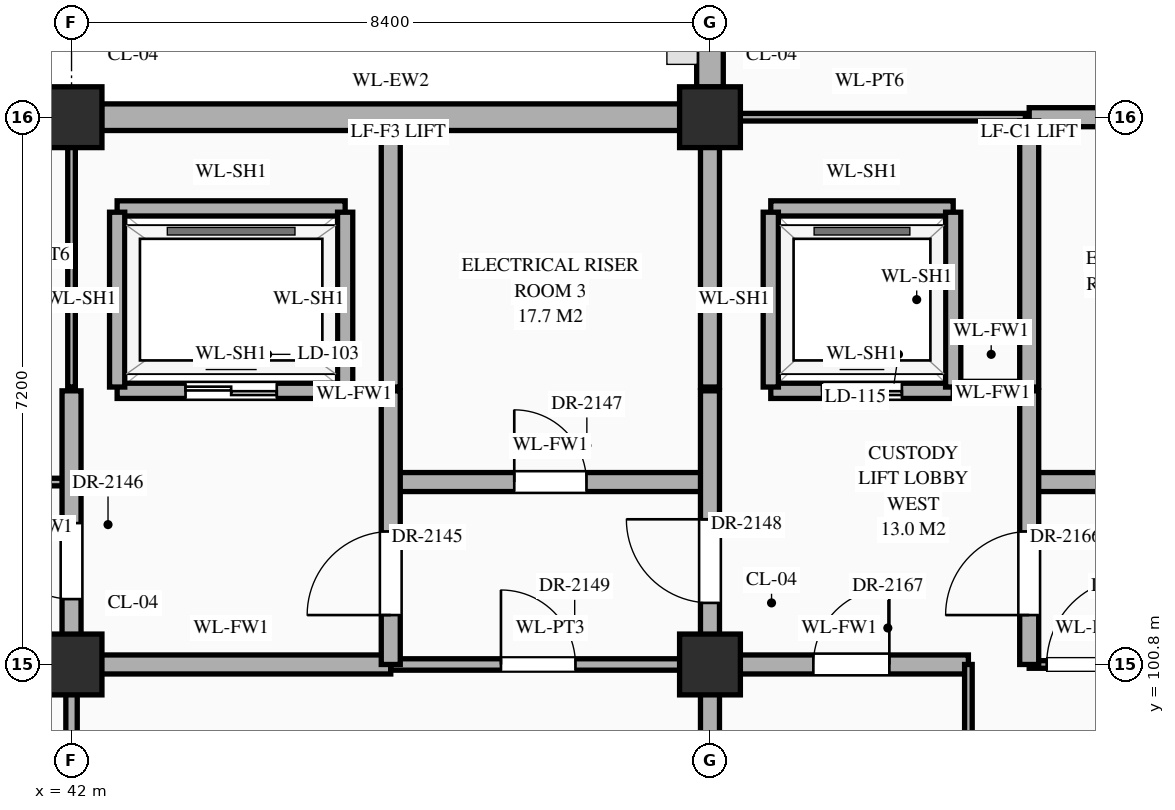
"""IFC4 building model, lengths in metres.
Left out: names, types, materials, properties, quantities, classifications, styles, units other than length and angle.
Written with IfcOpenShell. Run it as: python <this file> out.ifc"""

import sys

from ifc_helpers import new_model, si_unit, direction, frame, frame_2d, origin, origin_2d, place, context, subcontext, project, spatial, rectangle, extrude, element, fill, save


model = new_model("IFC4")
c1 = context("Model", 3, precision=1e-05, world=origin(), true_north=direction((0.0, 1.0)))
c2 = subcontext(c1, "Body", "Model", "MODEL_VIEW")
j1 = project(units=[si_unit("LENGTHUNIT", "METRE"), si_unit("PLANEANGLEUNIT", "RADIAN")], contexts=[c1])
p1 = place(None, origin())
s1 = spatial("IfcSite", under=j1, at=p1, CompositionType="ELEMENT")
p2 = place(p1, origin())
s2 = spatial("IfcBuilding", under=s1, at=p2, CompositionType="ELEMENT")
p3 = place(p2, frame((0.0, 0.0, 26.1)))
s3 = spatial("IfcBuildingStorey", under=s2, at=p3, CompositionType="ELEMENT", Elevation=26.1)
for number, where, z_axis, x_axis in (
    (1, (42.0, 100.8, 0.0), (0.0, 0.0, 1.0), (1.0, 0.0, 0.0)),
    (2, (42.0, 108.0, 0.0), (0.0, 0.0, 1.0), (1.0, 0.0, 0.0)),
    (3, (50.4, 100.8, 0.0), (0.0, 0.0, 1.0), (1.0, 0.0, 0.0)),
    (4, (50.4, 108.0, 0.0), (0.0, 0.0, 1.0), (1.0, 0.0, 0.0)),
):
    element("IfcColumn", number, at=place(p3, frame(where, z_axis=z_axis, x_axis=x_axis)), inside=s3, PredefinedType="COLUMN", context=c2, shape_type="SweptSolid", body=[
        extrude(rectangle(XDim=0.8, YDim=0.8, at=origin_2d()), origin(), (0.0, 0.0, 1.0), 4.5),
    ])
p4 = place(p3, frame((42.395, 108.0, 0.0), z_axis=(0.0, 0.0, 1.0), x_axis=(1.0, 0.0, 0.0)))
e5 = element("IfcWall", 5, at=p4, inside=s3, PredefinedType="STANDARD", context=c2, shape_type="SweptSolid", body=[
    extrude(rectangle(XDim=7.61, YDim=0.35, at=frame_2d((3.805, 0.0))), origin(), (0.0, 0.0, 1.0), 3.59),
])
p5 = place(p3, frame((50.4, 108.395, 0.0), z_axis=(0.0, 0.0, 1.0), x_axis=(0.0, 1.0, 0.0)))
e6 = element("IfcWall", 6, at=p5, inside=s3, PredefinedType="STANDARD", context=c2, shape_type="SweptSolid", body=[
    extrude(rectangle(XDim=6.41, YDim=0.35, at=frame_2d((3.205, 0.0))), origin(), (0.0, 0.0, 1.0), 3.59),
])
p6 = place(p5, frame((3.73, 0.0, 0.85)))
e7 = element("IfcOpeningElement", 7, at=p6, cuts=e6, PredefinedType="OPENING", context=c2, shape_type="SweptSolid", body=[
    extrude(rectangle(XDim=1.55, YDim=1.38, at=frame_2d((0.775, 0.69))), frame((0.0, 0.187, 0.0), z_axis=(0.0, -1.0, 0.0), x_axis=(1.0, 0.0, 0.0)), (0.0, 0.0, 1.0), 0.374),
])
p7 = place(p3, frame((31.0, 100.8, 0.0), z_axis=(0.0, 0.0, 1.0), x_axis=(1.0, 0.0, 0.0)))
e8 = element("IfcWall", 8, at=p7, inside=s3, PredefinedType="STANDARD", context=c2, shape_type="SweptSolid", body=[
    extrude(rectangle(XDim=11.0, YDim=0.15, at=frame_2d((5.5, 0.0))), origin(), (0.0, 0.0, 1.0), 3.39),
])
p8 = place(p7, frame((0.67, 0.0, 0.0)))
e9 = element("IfcOpeningElement", 9, at=p8, cuts=e8, PredefinedType="OPENING", context=c2, shape_type="SweptSolid", body=[
    extrude(rectangle(XDim=0.94, YDim=2.3, at=frame_2d((0.47, 1.15))), frame((0.0, 0.087, 0.0), z_axis=(0.0, -1.0, 0.0), x_axis=(1.0, 0.0, 0.0)), (0.0, 0.0, 1.0), 0.174),
])
p9 = place(p7, frame((6.31, 0.0, 0.0)))
e10 = element("IfcOpeningElement", 10, at=p9, cuts=e8, PredefinedType="OPENING", context=c2, shape_type="SweptSolid", body=[
    extrude(rectangle(XDim=0.98, YDim=2.35, at=frame_2d((0.49, 1.175))), frame((0.0, 0.087, 0.0), z_axis=(0.0, -1.0, 0.0), x_axis=(1.0, 0.0, 0.0)), (0.0, 0.0, 1.0), 0.174),
])
p10 = place(p3, frame((42.0, 100.8, 0.0), z_axis=(0.0, 0.0, 1.0), x_axis=(1.0, 0.0, 0.0)))
e11 = element("IfcWall", 11, at=p10, inside=s3, PredefinedType="STANDARD", context=c2, shape_type="SweptSolid", body=[
    extrude(rectangle(XDim=4.2, YDim=0.25, at=frame_2d((2.1, 0.0))), origin(), (0.0, 0.0, 1.0), 3.39),
])
p11 = place(p3, frame((46.2, 100.8, 0.0), z_axis=(0.0, 0.0, 1.0), x_axis=(1.0, 0.0, 0.0)))
e12 = element("IfcWall", 12, at=p11, inside=s3, PredefinedType="STANDARD", context=c2, shape_type="SweptSolid", body=[
    extrude(rectangle(XDim=4.2, YDim=0.15, at=frame_2d((2.1, 0.0))), origin(), (0.0, 0.0, 1.0), 3.39),
])
p12 = place(p11, frame((1.45, 0.0, 0.0)))
e13 = element("IfcOpeningElement", 13, at=p12, cuts=e12, PredefinedType="OPENING", context=c2, shape_type="SweptSolid", body=[
    extrude(rectangle(XDim=0.98, YDim=2.35, at=frame_2d((0.49, 1.175))), frame((0.0, 0.087, 0.0), z_axis=(0.0, -1.0, 0.0), x_axis=(1.0, 0.0, 0.0)), (0.0, 0.0, 1.0), 0.174),
])
p13 = place(p3, frame((50.4, 100.8, 0.0), z_axis=(0.0, 0.0, 1.0), x_axis=(1.0, 0.0, 0.0)))
e14 = element("IfcWall", 14, at=p13, inside=s3, PredefinedType="STANDARD", context=c2, shape_type="SweptSolid", body=[
    extrude(rectangle(XDim=3.4, YDim=0.25, at=frame_2d((1.7, 0.0))), origin(), (0.0, 0.0, 1.0), 3.39),
])
p14 = place(p13, frame((1.36, 0.0, 0.0)))
e15 = element("IfcOpeningElement", 15, at=p14, cuts=e14, PredefinedType="OPENING", context=c2, shape_type="SweptSolid", body=[
    extrude(rectangle(XDim=1.0, YDim=2.2, at=frame_2d((0.5, 1.1))), frame((0.0, 0.137, 0.0), z_axis=(0.0, -1.0, 0.0), x_axis=(1.0, 0.0, 0.0)), (0.0, 0.0, 1.0), 0.274),
])
p15 = place(p3, frame((54.6, 100.8, 0.0), z_axis=(0.0, 0.0, 1.0), x_axis=(1.0, 0.0, 0.0)))
e16 = element("IfcWall", 16, at=p15, inside=s3, PredefinedType="STANDARD", context=c2, shape_type="SweptSolid", body=[
    extrude(rectangle(XDim=1.6, YDim=0.1, at=frame_2d((0.8, 0.0))), origin(), (0.0, 0.0, 1.0), 3.39),
])
p16 = place(p15, frame((0.23, 0.0, 0.0)))
e17 = element("IfcOpeningElement", 17, at=p16, cuts=e16, PredefinedType="OPENING", context=c2, shape_type="SweptSolid", body=[
    extrude(rectangle(XDim=1.14, YDim=2.4, at=frame_2d((0.57, 1.2))), frame((0.0, 0.062, 0.0), z_axis=(0.0, -1.0, 0.0), x_axis=(1.0, 0.0, 0.0)), (0.0, 0.0, 1.0), 0.124),
])
p17 = place(p3, frame((25.24, 103.2, 0.0), z_axis=(0.0, 0.0, 1.0), x_axis=(1.0, 0.0, 0.0)))
e18 = element("IfcWall", 18, at=p17, inside=s3, PredefinedType="STANDARD", context=c2, shape_type="SweptSolid", body=[
    extrude(rectangle(XDim=16.76, YDim=0.1, at=frame_2d((8.38, 0.0))), origin(), (0.0, 0.0, 1.0), 4.24),
])
p18 = place(p17, frame((3.6, 0.0, 0.0)))
e19 = element("IfcOpeningElement", 19, at=p18, cuts=e18, PredefinedType="OPENING", context=c2, shape_type="SweptSolid", body=[
    extrude(rectangle(XDim=1.16, YDim=2.3, at=frame_2d((0.58, 1.15))), frame((0.0, 0.062, 0.0), z_axis=(0.0, -1.0, 0.0), x_axis=(1.0, 0.0, 0.0)), (0.0, 0.0, 1.0), 0.124),
])
p19 = place(p17, frame((11.96, 0.0, 0.0)))
e20 = element("IfcOpeningElement", 20, at=p19, cuts=e18, PredefinedType="OPENING", context=c2, shape_type="SweptSolid", body=[
    extrude(rectangle(XDim=1.2, YDim=2.35, at=frame_2d((0.6, 1.175))), frame((0.0, 0.062, 0.0), z_axis=(0.0, -1.0, 0.0), x_axis=(1.0, 0.0, 0.0)), (0.0, 0.0, 1.0), 0.124),
])
p20 = place(p3, frame((46.2, 103.2, 0.0), z_axis=(0.0, 0.0, 1.0), x_axis=(1.0, 0.0, 0.0)))
e21 = element("IfcWall", 21, at=p20, inside=s3, PredefinedType="STANDARD", context=c2, shape_type="SweptSolid", body=[
    extrude(rectangle(XDim=4.2, YDim=0.25, at=frame_2d((2.1, 0.0))), origin(), (0.0, 0.0, 1.0), 4.24),
])
p21 = place(p20, frame((1.625, 0.0, 0.0)))
e22 = element("IfcOpeningElement", 22, at=p21, cuts=e21, PredefinedType="OPENING", context=c2, shape_type="SweptSolid", body=[
    extrude(rectangle(XDim=0.95, YDim=2.15, at=frame_2d((0.475, 1.075))), frame((0.0, 0.137, 0.0), z_axis=(0.0, -1.0, 0.0), x_axis=(1.0, 0.0, 0.0)), (0.0, 0.0, 1.0), 0.274),
])
p22 = place(p3, frame((54.6, 103.2, 0.0), z_axis=(0.0, 0.0, 1.0), x_axis=(1.0, 0.0, 0.0)))
e23 = element("IfcWall", 23, at=p22, inside=s3, PredefinedType="STANDARD", context=c2, shape_type="SweptSolid", body=[
    extrude(rectangle(XDim=4.2, YDim=0.25, at=frame_2d((2.1, 0.0))), origin(), (0.0, 0.0, 1.0), 4.24),
])
p23 = place(p22, frame((1.625, 0.0, 0.0)))
e24 = element("IfcOpeningElement", 24, at=p23, cuts=e23, PredefinedType="OPENING", context=c2, shape_type="SweptSolid", body=[
    extrude(rectangle(XDim=0.95, YDim=2.15, at=frame_2d((0.475, 1.075))), frame((0.0, 0.137, 0.0), z_axis=(0.0, -1.0, 0.0), x_axis=(1.0, 0.0, 0.0)), (0.0, 0.0, 1.0), 0.274),
])
p24 = place(p3, frame((42.6, 104.4, 0.0), z_axis=(0.0, 0.0, 1.0), x_axis=(1.0, 0.0, 0.0)))
e25 = element("IfcWall", 25, at=p24, inside=s3, PredefinedType="STANDARD", context=c2, shape_type="SweptSolid", body=[
    extrude(rectangle(XDim=3.0, YDim=0.2, at=frame_2d((1.5, 0.0))), origin(), (0.0, 0.0, 1.0), 4.24),
])
p25 = place(p24, frame((0.9, 0.0, 0.0)))
e26 = element("IfcOpeningElement", 26, at=p25, cuts=e25, PredefinedType="OPENING", context=c2, shape_type="SweptSolid", body=[
    extrude(rectangle(XDim=1.2, YDim=2.15, at=frame_2d((0.6, 1.075))), frame((0.0, 0.112, 0.0), z_axis=(0.0, -1.0, 0.0), x_axis=(1.0, 0.0, 0.0)), (0.0, 0.0, 1.0), 0.224),
])
p26 = place(p3, frame((51.2, 104.4, 0.0), z_axis=(0.0, 0.0, 1.0), x_axis=(1.0, 0.0, 0.0)))
e27 = element("IfcWall", 27, at=p26, inside=s3, PredefinedType="STANDARD", context=c2, shape_type="SweptSolid", body=[
    extrude(rectangle(XDim=2.4, YDim=0.2, at=frame_2d((1.2, 0.0))), origin(), (0.0, 0.0, 1.0), 4.24),
])
p27 = place(p26, frame((0.675, 0.0, 0.0)))
e28 = element("IfcOpeningElement", 28, at=p27, cuts=e27, PredefinedType="OPENING", context=c2, shape_type="SweptSolid", body=[
    extrude(rectangle(XDim=1.05, YDim=2.15, at=frame_2d((0.525, 1.075))), frame((0.0, 0.112, 0.0), z_axis=(0.0, -1.0, 0.0), x_axis=(1.0, 0.0, 0.0)), (0.0, 0.0, 1.0), 0.224),
])
p28 = place(p3, frame((53.65, 104.4, 0.0), z_axis=(0.0, 0.0, 1.0), x_axis=(1.0, 0.0, 0.0)))
e29 = element("IfcWall", 29, at=p28, inside=s3, PredefinedType="STANDARD", context=c2, shape_type="SweptSolid", body=[
    extrude(rectangle(XDim=0.9, YDim=0.25, at=frame_2d((0.45, 0.0))), origin(), (0.0, 0.0, 1.0), 4.24),
])
p29 = place(p3, frame((42.6, 106.8, 0.0), z_axis=(0.0, 0.0, 1.0), x_axis=(1.0, 0.0, 0.0)))
e30 = element("IfcWall", 30, at=p29, inside=s3, PredefinedType="STANDARD", context=c2, shape_type="SweptSolid", body=[
    extrude(rectangle(XDim=3.0, YDim=0.2, at=frame_2d((1.5, 0.0))), origin(), (0.0, 0.0, 1.0), 4.24),
])
p30 = place(p3, frame((51.2, 106.8, 0.0), z_axis=(0.0, 0.0, 1.0), x_axis=(1.0, 0.0, 0.0)))
e31 = element("IfcWall", 31, at=p30, inside=s3, PredefinedType="STANDARD", context=c2, shape_type="SweptSolid", body=[
    extrude(rectangle(XDim=2.4, YDim=0.2, at=frame_2d((1.2, 0.0))), origin(), (0.0, 0.0, 1.0), 4.24),
])
p31 = place(p3, frame((50.45, 108.0, 0.0), z_axis=(0.0, 0.0, 1.0), x_axis=(1.0, 0.0, 0.0)))
e32 = element("IfcWall", 32, at=p31, inside=s3, PredefinedType="STANDARD", context=c2, shape_type="SweptSolid", body=[
    extrude(rectangle(XDim=4.1, YDim=0.1, at=frame_2d((2.05, 0.0))), origin(), (0.0, 0.0, 1.0), 3.39),
])
p32 = place(p3, frame((54.6, 108.0, 0.0), z_axis=(0.0, 0.0, 1.0), x_axis=(1.0, 0.0, 0.0)))
e33 = element("IfcWall", 33, at=p32, inside=s3, PredefinedType="STANDARD", context=c2, shape_type="SweptSolid", body=[
    extrude(rectangle(XDim=4.2, YDim=0.25, at=frame_2d((2.1, 0.0))), origin(), (0.0, 0.0, 1.0), 3.39),
])
p33 = place(p32, frame((1.465, 0.0, 0.0)))
e34 = element("IfcOpeningElement", 34, at=p33, cuts=e33, PredefinedType="OPENING", context=c2, shape_type="SweptSolid", body=[
    extrude(rectangle(XDim=0.95, YDim=2.15, at=frame_2d((0.475, 1.075))), frame((0.0, 0.137, 0.0), z_axis=(0.0, -1.0, 0.0), x_axis=(1.0, 0.0, 0.0)), (0.0, 0.0, 1.0), 0.274),
])
p34 = place(p3, frame((42.0, 96.0, 0.0), z_axis=(0.0, 0.0, 1.0), x_axis=(0.0, 1.0, 0.0)))
e35 = element("IfcWall", 35, at=p34, inside=s3, PredefinedType="STANDARD", context=c2, shape_type="SweptSolid", body=[
    extrude(rectangle(XDim=4.8, YDim=0.15, at=frame_2d((2.4, 0.0))), origin(), (0.0, 0.0, 1.0), 3.49),
])
p35 = place(p3, frame((42.0, 100.8, 0.0), z_axis=(0.0, 0.0, 1.0), x_axis=(0.0, 1.0, 0.0)))
e36 = element("IfcWall", 36, at=p35, inside=s3, PredefinedType="STANDARD", context=c2, shape_type="SweptSolid", body=[
    extrude(rectangle(XDim=3.6, YDim=0.25, at=frame_2d((1.8, 0.0))), origin(), (0.0, 0.0, 1.0), 3.49),
])
p36 = place(p35, frame((0.86, 0.0, 0.0)))
e37 = element("IfcOpeningElement", 37, at=p36, cuts=e36, PredefinedType="OPENING", context=c2, shape_type="SweptSolid", body=[
    extrude(rectangle(XDim=1.0, YDim=2.2, at=frame_2d((0.5, 1.1))), frame((0.0, 0.137, 0.0), z_axis=(0.0, -1.0, 0.0), x_axis=(1.0, 0.0, 0.0)), (0.0, 0.0, 1.0), 0.274),
])
p37 = place(p3, frame((42.0, 104.45, 0.0), z_axis=(0.0, 0.0, 1.0), x_axis=(0.0, 1.0, 0.0)))
e38 = element("IfcWall", 38, at=p37, inside=s3, PredefinedType="STANDARD", context=c2, shape_type="SweptSolid", body=[
    extrude(rectangle(XDim=3.46, YDim=0.1, at=frame_2d((1.73, 0.0))), origin(), (0.0, 0.0, 1.0), 3.49),
])
for number, where, z_axis, x_axis in (
    (39, (42.6, 104.45, 0.0), (0.0, 0.0, 1.0), (0.0, 1.0, 0.0)),
    (40, (45.6, 104.45, 0.0), (0.0, 0.0, 1.0), (0.0, 1.0, 0.0)),
):
    element("IfcWall", number, at=place(p3, frame(where, z_axis=z_axis, x_axis=x_axis)), inside=s3, PredefinedType="STANDARD", context=c2, shape_type="SweptSolid", body=[
        extrude(rectangle(XDim=2.3, YDim=0.2, at=frame_2d((1.15, 0.0))), origin(), (0.0, 0.0, 1.0), 4.24),
    ])
p38 = place(p3, frame((46.2, 100.8, 0.0), z_axis=(0.0, 0.0, 1.0), x_axis=(0.0, 1.0, 0.0)))
e41 = element("IfcWall", 41, at=p38, inside=s3, PredefinedType="STANDARD", context=c2, shape_type="SweptSolid", body=[
    extrude(rectangle(XDim=3.6, YDim=0.25, at=frame_2d((1.8, 0.0))), origin(), (0.0, 0.0, 1.0), 3.89),
])
p39 = place(p38, frame((0.65, 0.0, 0.0)))
e42 = element("IfcOpeningElement", 42, at=p39, cuts=e41, PredefinedType="OPENING", context=c2, shape_type="SweptSolid", body=[
    extrude(rectangle(XDim=1.1, YDim=2.2, at=frame_2d((0.55, 1.1))), frame((0.0, 0.137, 0.0), z_axis=(0.0, -1.0, 0.0), x_axis=(1.0, 0.0, 0.0)), (0.0, 0.0, 1.0), 0.274),
])
p40 = place(p3, frame((46.2, 104.45, 0.0), z_axis=(0.0, 0.0, 1.0), x_axis=(0.0, 1.0, 0.0)))
e43 = element("IfcWall", 43, at=p40, inside=s3, PredefinedType="STANDARD", context=c2, shape_type="SweptSolid", body=[
    extrude(rectangle(XDim=3.46, YDim=0.25, at=frame_2d((1.73, 0.0))), origin(), (0.0, 0.0, 1.0), 3.89),
])
p41 = place(p3, frame((50.4, 91.2, 0.0), z_axis=(0.0, 0.0, 1.0), x_axis=(0.0, 1.0, 0.0)))
e44 = element("IfcWall", 44, at=p41, inside=s3, PredefinedType="STANDARD", context=c2, shape_type="SweptSolid", body=[
    extrude(rectangle(XDim=13.2, YDim=0.25, at=frame_2d((6.6, 0.0))), origin(), (0.0, 0.0, 1.0), 3.49),
])
p42 = place(p41, frame((0.54, 0.0, 0.0)))
e45 = element("IfcOpeningElement", 45, at=p42, cuts=e44, PredefinedType="OPENING", context=c2, shape_type="SweptSolid", body=[
    extrude(rectangle(XDim=1.0, YDim=2.2, at=frame_2d((0.5, 1.1))), frame((0.0, 0.137, 0.0), z_axis=(0.0, -1.0, 0.0), x_axis=(1.0, 0.0, 0.0)), (0.0, 0.0, 1.0), 0.274),
])
p43 = place(p41, frame((10.41, 0.0, 0.0)))
e46 = element("IfcOpeningElement", 46, at=p43, cuts=e44, PredefinedType="OPENING", context=c2, shape_type="SweptSolid", body=[
    extrude(rectangle(XDim=1.1, YDim=2.2, at=frame_2d((0.55, 1.1))), frame((0.0, 0.137, 0.0), z_axis=(0.0, -1.0, 0.0), x_axis=(1.0, 0.0, 0.0)), (0.0, 0.0, 1.0), 0.274),
])
p44 = place(p41, frame((3.285, 0.0, 0.0)))
e47 = element("IfcOpeningElement", 47, at=p44, cuts=e44, PredefinedType="OPENING", context=c2, shape_type="SweptSolid", body=[
    extrude(rectangle(XDim=0.95, YDim=2.15, at=frame_2d((0.475, 1.075))), frame((0.0, 0.137, 0.0), z_axis=(0.0, -1.0, 0.0), x_axis=(1.0, 0.0, 0.0)), (0.0, 0.0, 1.0), 0.274),
])
p45 = place(p3, frame((50.4, 104.45, 0.0), z_axis=(0.0, 0.0, 1.0), x_axis=(0.0, 1.0, 0.0)))
e48 = element("IfcWall", 48, at=p45, inside=s3, PredefinedType="STANDARD", context=c2, shape_type="SweptSolid", body=[
    extrude(rectangle(XDim=3.46, YDim=0.25, at=frame_2d((1.73, 0.0))), origin(), (0.0, 0.0, 1.0), 3.49),
])
for number, where, z_axis, x_axis in (
    (49, (51.2, 104.45, 0.0), (0.0, 0.0, 1.0), (0.0, 1.0, 0.0)),
    (50, (53.6, 104.45, 0.0), (0.0, 0.0, 1.0), (0.0, 1.0, 0.0)),
):
    element("IfcWall", number, at=place(p3, frame(where, z_axis=z_axis, x_axis=x_axis)), inside=s3, PredefinedType="STANDARD", context=c2, shape_type="SweptSolid", body=[
        extrude(rectangle(XDim=2.3, YDim=0.2, at=frame_2d((1.15, 0.0))), origin(), (0.0, 0.0, 1.0), 4.24),
    ])
p46 = place(p3, frame((53.8, 96.0, 0.0), z_axis=(0.0, 0.0, 1.0), x_axis=(0.0, 1.0, 0.0)))
e51 = element("IfcWall", 51, at=p46, inside=s3, PredefinedType="STANDARD", context=c2, shape_type="SweptSolid", body=[
    extrude(rectangle(XDim=4.8, YDim=0.1, at=frame_2d((2.4, 0.0))), origin(), (0.0, 0.0, 1.0), 4.24),
])
p47 = place(p46, frame((1.92, 0.0, 0.0)))
e52 = element("IfcOpeningElement", 52, at=p47, cuts=e51, PredefinedType="OPENING", context=c2, shape_type="SweptSolid", body=[
    extrude(rectangle(XDim=0.96, YDim=2.2, at=frame_2d((0.48, 1.1))), frame((0.0, 0.062, 0.0), z_axis=(0.0, -1.0, 0.0), x_axis=(1.0, 0.0, 0.0)), (0.0, 0.0, 1.0), 0.124),
])
p48 = place(p3, frame((54.6, 100.8, 0.0), z_axis=(0.0, 0.0, 1.0), x_axis=(0.0, 1.0, 0.0)))
e53 = element("IfcWall", 53, at=p48, inside=s3, PredefinedType="STANDARD", context=c2, shape_type="SweptSolid", body=[
    extrude(rectangle(XDim=3.6, YDim=0.25, at=frame_2d((1.8, 0.0))), origin(), (0.0, 0.0, 1.0), 3.94),
])
p49 = place(p48, frame((0.65, 0.0, 0.0)))
e54 = element("IfcOpeningElement", 54, at=p49, cuts=e53, PredefinedType="OPENING", context=c2, shape_type="SweptSolid", body=[
    extrude(rectangle(XDim=1.1, YDim=2.2, at=frame_2d((0.55, 1.1))), frame((0.0, 0.137, 0.0), z_axis=(0.0, -1.0, 0.0), x_axis=(1.0, 0.0, 0.0)), (0.0, 0.0, 1.0), 0.274),
])
p50 = place(p3, frame((54.6, 104.45, 0.0), z_axis=(0.0, 0.0, 1.0), x_axis=(0.0, 1.0, 0.0)))
e55 = element("IfcWall", 55, at=p50, inside=s3, PredefinedType="STANDARD", context=c2, shape_type="SweptSolid", body=[
    extrude(rectangle(XDim=3.5, YDim=0.25, at=frame_2d((1.75, 0.0))), origin(), (0.0, 0.0, 1.0), 3.94),
])
p51 = place(p25, origin())
e56 = element("IfcDoor", 56, at=p51, inside=s3, OperationType="DOUBLE_DOOR_SLIDING", PredefinedType="DOOR", context=c2, shape_type="SweptSolid", body=[
    extrude(rectangle(XDim=1.2, YDim=2.15, at=frame_2d((0.6, 1.075))), frame((0.0, 0.025, 0.0), z_axis=(0.0, -1.0, 0.0), x_axis=(1.0, 0.0, 0.0)), (0.0, 0.0, 1.0), 0.05),
])
fill(e26, e56)
p52 = place(p27, origin())
e57 = element("IfcDoor", 57, at=p52, inside=s3, OperationType="DOUBLE_DOOR_SLIDING", PredefinedType="DOOR", context=c2, shape_type="SweptSolid", body=[
    extrude(rectangle(XDim=1.05, YDim=2.15, at=frame_2d((0.525, 1.075))), frame((0.0, 0.025, 0.0), z_axis=(0.0, -1.0, 0.0), x_axis=(1.0, 0.0, 0.0)), (0.0, 0.0, 1.0), 0.05),
])
fill(e28, e57)
p53 = place(p39, origin())
e58 = element("IfcDoor", 58, at=p53, inside=s3, OperationType="SINGLE_SWING_LEFT", PredefinedType="DOOR", context=c2, shape_type="SweptSolid", body=[
    extrude(rectangle(XDim=1.1, YDim=2.2, at=frame_2d((0.55, 1.1))), frame((0.0, 0.025, 0.0), z_axis=(0.0, -1.0, 0.0), x_axis=(1.0, 0.0, 0.0)), (0.0, 0.0, 1.0), 0.05),
])
fill(e42, e58)
p54 = place(p36, origin())
e59 = element("IfcDoor", 59, at=p54, inside=s3, OperationType="SINGLE_SWING_RIGHT", PredefinedType="DOOR", context=c2, shape_type="SweptSolid", body=[
    extrude(rectangle(XDim=1.0, YDim=2.2, at=frame_2d((0.5, 1.1))), frame((0.0, 0.025, 0.0), z_axis=(0.0, -1.0, 0.0), x_axis=(1.0, 0.0, 0.0)), (0.0, 0.0, 1.0), 0.05),
])
fill(e37, e59)
p55 = place(p21, origin())
e60 = element("IfcDoor", 60, at=p55, inside=s3, OperationType="SINGLE_SWING_LEFT", PredefinedType="DOOR", context=c2, shape_type="SweptSolid", body=[
    extrude(rectangle(XDim=0.95, YDim=2.15, at=frame_2d((0.475, 1.075))), frame((0.0, 0.025, 0.0), z_axis=(0.0, -1.0, 0.0), x_axis=(1.0, 0.0, 0.0)), (0.0, 0.0, 1.0), 0.05),
])
fill(e22, e60)
p56 = place(p43, origin())
e61 = element("IfcDoor", 61, at=p56, inside=s3, OperationType="SINGLE_SWING_RIGHT", PredefinedType="DOOR", context=c2, shape_type="SweptSolid", body=[
    extrude(rectangle(XDim=1.1, YDim=2.2, at=frame_2d((0.55, 1.1))), frame((0.0, 0.025, 0.0), z_axis=(0.0, -1.0, 0.0), x_axis=(1.0, 0.0, 0.0)), (0.0, 0.0, 1.0), 0.05),
])
fill(e46, e61)
p57 = place(p12, origin())
e62 = element("IfcDoor", 62, at=p57, inside=s3, OperationType="SINGLE_SWING_LEFT", PredefinedType="DOOR", context=c2, shape_type="SweptSolid", body=[
    extrude(rectangle(XDim=0.98, YDim=2.35, at=frame_2d((0.49, 1.175))), frame((0.0, 0.025, 0.0), z_axis=(0.0, -1.0, 0.0), x_axis=(1.0, 0.0, 0.0)), (0.0, 0.0, 1.0), 0.05),
])
fill(e13, e62)
p58 = place(p49, origin())
e63 = element("IfcDoor", 63, at=p58, inside=s3, OperationType="SINGLE_SWING_LEFT", PredefinedType="DOOR", context=c2, shape_type="SweptSolid", body=[
    extrude(rectangle(XDim=1.1, YDim=2.2, at=frame_2d((0.55, 1.1))), frame((0.0, 0.025, 0.0), z_axis=(0.0, -1.0, 0.0), x_axis=(1.0, 0.0, 0.0)), (0.0, 0.0, 1.0), 0.05),
])
fill(e54, e63)
p59 = place(p14, origin())
e64 = element("IfcDoor", 64, at=p59, inside=s3, OperationType="SINGLE_SWING_RIGHT", PredefinedType="DOOR", context=c2, shape_type="SweptSolid", body=[
    extrude(rectangle(XDim=1.0, YDim=2.2, at=frame_2d((0.5, 1.1))), frame((0.0, 0.025, 0.0), z_axis=(0.0, -1.0, 0.0), x_axis=(1.0, 0.0, 0.0)), (0.0, 0.0, 1.0), 0.05),
])
fill(e15, e64)
p60 = place(p16, origin())
e65 = element("IfcDoor", 65, at=p60, inside=s3, OperationType="SINGLE_SWING_RIGHT", PredefinedType="DOOR", context=c2, shape_type="SweptSolid", body=[
    extrude(rectangle(XDim=1.14, YDim=2.4, at=frame_2d((0.57, 1.2))), frame((0.0, 0.025, 0.0), z_axis=(0.0, -1.0, 0.0), x_axis=(1.0, 0.0, 0.0)), (0.0, 0.0, 1.0), 0.05),
])
fill(e17, e65)
save(model, sys.argv[1])
